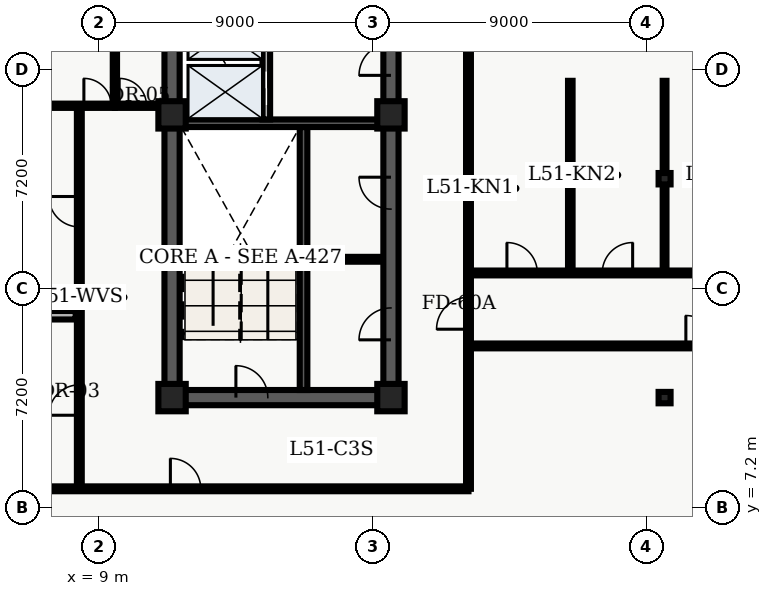
"""IFC4 building model, lengths in metres.
Left out: names, types, materials, properties, quantities, classifications, styles, units other than length and angle.
Written with IfcOpenShell. Run it as: python <this file> out.ifc"""

import sys

from ifc_helpers import new_model, entity, si_unit, converted_unit, direction, frame, origin_with_axes, origin_2d_with_axis, place, context, subcontext, project, spatial, polyline, rectangle, i_section, outline, extrude, element, fill, save


model = new_model("IFC4")
c1 = context("Model", 3, precision=1e-05, world=origin_with_axes(), true_north=direction((0.0, 1.0)))
c2 = subcontext(c1, "Body", "Model", "MODEL_VIEW")
j1 = project(units=[si_unit("LENGTHUNIT", "METRE"), converted_unit("PLANEANGLEUNIT", "DEGREE", entity("IfcPlaneAngleMeasure", 0.017), si_unit("PLANEANGLEUNIT", "RADIAN"), dimensions=[0, 0, 0, 0, 0, 0, 0])], contexts=[c1])
p1 = place(None, origin_with_axes())
s1 = spatial("IfcSite", under=j1, at=p1, CompositionType="ELEMENT")
p2 = place(p1, origin_with_axes())
s2 = spatial("IfcBuilding", under=s1, at=p2, CompositionType="ELEMENT")
p3 = place(p2, frame((0.0, 0.0, 208.2), z_axis=(0.0, 0.0, 1.0), x_axis=(1.0, 0.0, 0.0)))
s3 = spatial("IfcBuildingStorey", under=s2, at=p3, CompositionType="ELEMENT", Elevation=208.2)
p4 = place(p3, frame((11.4, 10.8, 0.0), z_axis=(0.0, 0.0, 1.0), x_axis=(0.0, 1.0, 0.0)))
e1 = element("IfcWall", 1, at=p4, inside=s3, PredefinedType="SHEAR", context=c2, shape_type="SweptSolid", body=[
    extrude(outline(polyline([(0.0, -0.25), (27.0, -0.25), (27.0, 0.25), (0.0, 0.25), (0.0, -0.25)])), origin_with_axes(), (0.0, 0.0, 1.0), 3.66),
])
p5 = place(p3, frame((11.4, 10.8, 0.0), z_axis=(0.0, 0.0, 1.0), x_axis=(1.0, 0.0, 0.0)))
e2 = element("IfcWall", 2, at=p5, inside=s3, PredefinedType="SHEAR", context=c2, shape_type="SweptSolid", body=[
    extrude(outline(polyline([(0.0, -0.25), (7.2, -0.25), (7.2, 0.25), (0.0, 0.25), (0.0, -0.25)])), origin_with_axes(), (0.0, 0.0, 1.0), 3.66),
])
p6 = place(p5, frame((2.625, 0.0, 0.0), z_axis=(0.0, 0.0, 1.0), x_axis=(1.0, 0.0, 0.0)))
e3 = element("IfcOpeningElement", 3, at=p6, cuts=e2, PredefinedType="OPENING", context=c2, shape_type="SweptSolid", body=[
    extrude(rectangle(XDim=1.05, YDim=0.52, at=origin_2d_with_axis()), origin_with_axes(), (0.0, 0.0, 1.0), 2.15),
])
p7 = place(p3, frame((18.6, 10.8, 0.0), z_axis=(0.0, 0.0, 1.0), x_axis=(0.0, 1.0, 0.0)))
e4 = element("IfcWall", 4, at=p7, inside=s3, PredefinedType="SHEAR", context=c2, shape_type="SweptSolid", body=[
    extrude(outline(polyline([(0.0, -0.25), (13.5, -0.25), (13.5, 0.25), (0.0, 0.25), (0.0, -0.25)])), origin_with_axes(), (0.0, 0.0, 1.0), 3.66),
])
p8 = place(p7, frame((11.125, 0.0, 0.0), z_axis=(0.0, 0.0, 1.0), x_axis=(1.0, 0.0, 0.0)))
e5 = element("IfcOpeningElement", 5, at=p8, cuts=e4, PredefinedType="OPENING", context=c2, shape_type="SweptSolid", body=[
    extrude(rectangle(XDim=1.05, YDim=0.52, at=origin_2d_with_axis()), origin_with_axes(), (0.0, 0.0, 1.0), 2.15),
])
p9 = place(p7, frame((2.425, 0.0, 0.0), z_axis=(0.0, 0.0, 1.0), x_axis=(1.0, 0.0, 0.0)))
e6 = element("IfcOpeningElement", 6, at=p9, cuts=e4, PredefinedType="OPENING", context=c2, shape_type="SweptSolid", body=[
    extrude(rectangle(XDim=1.05, YDim=0.52, at=origin_2d_with_axis()), origin_with_axes(), (0.0, 0.0, 1.0), 2.15),
])
p10 = place(p7, frame((6.725, 0.0, 0.0), z_axis=(0.0, 0.0, 1.0), x_axis=(1.0, 0.0, 0.0)))
e7 = element("IfcOpeningElement", 7, at=p10, cuts=e4, PredefinedType="OPENING", context=c2, shape_type="SweptSolid", body=[
    extrude(rectangle(XDim=1.05, YDim=0.52, at=origin_2d_with_axis()), origin_with_axes(), (0.0, 0.0, 1.0), 2.15),
])
p11 = place(p3, frame((15.725, 11.05, 0.0), z_axis=(0.0, 0.0, 1.0), x_axis=(0.0, 1.0, 0.0)))
e8 = element("IfcWall", 8, at=p11, inside=s3, PredefinedType="SHEAR", context=c2, shape_type="SweptSolid", body=[
    extrude(outline(polyline([(0.0, -0.125), (8.65, -0.125), (8.65, 0.125), (0.0, 0.125), (0.0, -0.125)])), origin_with_axes(), (0.0, 0.0, 1.0), 3.66),
])
p12 = place(p3, frame((11.65, 19.825, 0.0), z_axis=(0.0, 0.0, 1.0), x_axis=(1.0, 0.0, 0.0)))
e9 = element("IfcWall", 9, at=p12, inside=s3, PredefinedType="SHEAR", context=c2, shape_type="SweptSolid", body=[
    extrude(outline(polyline([(0.0, -0.125), (6.7, -0.125), (6.7, 0.125), (0.0, 0.125), (0.0, -0.125)])), origin_with_axes(), (0.0, 0.0, 1.0), 3.66),
])
p13 = place(p3, frame((14.5, 19.95, 0.0), z_axis=(0.0, 0.0, 1.0), x_axis=(0.0, 1.0, 0.0)))
e10 = element("IfcWall", 10, at=p13, inside=s3, PredefinedType="SOLIDWALL", context=c2, shape_type="SweptSolid", body=[
    extrude(outline(polyline([(0.0, -0.125), (6.25, -0.125), (6.25, 0.125), (0.0, 0.125), (0.0, -0.125)])), origin_with_axes(), (0.0, 0.0, 1.0), 2.7),
])
p14 = place(p13, frame((1.025, 0.0, 0.0), z_axis=(0.0, 0.0, 1.0), x_axis=(1.0, 0.0, 0.0)))
e11 = element("IfcOpeningElement", 11, at=p14, cuts=e10, PredefinedType="OPENING", context=c2, shape_type="SweptSolid", body=[
    extrude(rectangle(XDim=1.1, YDim=0.27, at=origin_2d_with_axis()), origin_with_axes(), (0.0, 0.0, 1.0), 2.15),
])
p15 = place(p13, frame((2.975, 0.0, 0.0), z_axis=(0.0, 0.0, 1.0), x_axis=(1.0, 0.0, 0.0)))
e12 = element("IfcOpeningElement", 12, at=p15, cuts=e10, PredefinedType="OPENING", context=c2, shape_type="SweptSolid", body=[
    extrude(rectangle(XDim=1.1, YDim=0.27, at=origin_2d_with_axis()), origin_with_axes(), (0.0, 0.0, 1.0), 2.15),
])
p16 = place(p13, frame((5.425, 0.0, 0.0), z_axis=(0.0, 0.0, 1.0), x_axis=(1.0, 0.0, 0.0)))
e13 = element("IfcOpeningElement", 13, at=p16, cuts=e10, PredefinedType="OPENING", context=c2, shape_type="SweptSolid", body=[
    extrude(rectangle(XDim=1.2, YDim=0.27, at=origin_2d_with_axis()), origin_with_axes(), (0.0, 0.0, 1.0), 2.15),
])
for number, where, z_axis, x_axis in (
    (14, (11.4, 10.8, 0.0), (0.0, 0.0, 1.0), (1.0, 0.0, 0.0)),
    (15, (11.4, 20.1, 0.0), (0.0, 0.0, 1.0), (1.0, 0.0, 0.0)),
    (16, (18.6, 10.8, 0.0), (0.0, 0.0, 1.0), (1.0, 0.0, 0.0)),
    (17, (18.6, 20.1, 0.0), (0.0, 0.0, 1.0), (1.0, 0.0, 0.0)),
):
    element("IfcColumn", number, at=place(p3, frame(where, z_axis=z_axis, x_axis=x_axis)), inside=s3, PredefinedType="COLUMN", context=c2, shape_type="SweptSolid", body=[
        extrude(rectangle(XDim=0.9, YDim=0.9, at=origin_2d_with_axis()), origin_with_axes(), (0.0, 0.0, 1.0), 3.9),
    ])
for number, where, z_axis, x_axis in (
    (18, (27.6, 10.8, 0.0), (0.0, 0.0, 1.0), (1.0, 0.0, 0.0)),
    (19, (27.6, 18.0, 0.0), (0.0, 0.0, 1.0), (1.0, 0.0, 0.0)),
):
    element("IfcColumn", number, at=place(p3, frame(where, z_axis=z_axis, x_axis=x_axis)), inside=s3, PredefinedType="COLUMN", context=c2, shape_type="SweptSolid", body=[
        extrude(i_section(OverallWidth=0.394, OverallDepth=0.375, WebThickness=0.017, FlangeThickness=0.028, FilletRadius=0.02, at=origin_2d_with_axis()), origin_with_axes(), (0.0, 0.0, 1.0), 3.9),
    ])
p17 = place(p3, frame((15.84, 15.35, 0.0), z_axis=(0.0, 0.0, 1.0), x_axis=(1.0, 0.0, 0.0)))
e20 = element("IfcWall", 20, at=p17, inside=s3, PredefinedType="PARTITIONING", context=c2, shape_type="SweptSolid", body=[
    extrude(outline(polyline([(0.0, -0.08), (2.46, -0.08), (2.46, 0.08), (0.0, 0.08), (0.0, -0.08)])), origin_with_axes(), (0.0, 0.0, 1.0), 2.7),
])
p18 = place(p3, frame((9.52, 20.4, 0.0), z_axis=(0.0, 0.0, 1.0), x_axis=(0.0, 1.0, 0.0)))
e21 = element("IfcWall", 21, at=p18, inside=s3, PredefinedType="PARTITIONING", context=c2, shape_type="SweptSolid", body=[
    extrude(outline(polyline([(0.0, -0.07), (4.0, -0.07), (4.0, 0.07), (0.0, 0.07), (0.0, -0.07)])), origin_with_axes(), (0.0, 0.0, 1.0), 2.7),
])
p19 = place(p3, frame((9.52, 20.4, 0.0), z_axis=(0.0, 0.0, 1.0), x_axis=(1.0, 0.0, 0.0)))
e22 = element("IfcWall", 22, at=p19, inside=s3, PredefinedType="PARTITIONING", context=c2, shape_type="SweptSolid", body=[
    extrude(outline(polyline([(0.0, -0.07), (1.58, -0.07), (1.58, 0.07), (0.0, 0.07), (0.0, -0.07)])), origin_with_axes(), (0.0, 0.0, 1.0), 2.7),
])
p20 = place(p19, frame((0.59, 0.0, 0.0), z_axis=(0.0, 0.0, 1.0), x_axis=(1.0, 0.0, 0.0)))
e23 = element("IfcOpeningElement", 23, at=p20, cuts=e22, PredefinedType="OPENING", context=c2, shape_type="SweptSolid", body=[
    extrude(rectangle(XDim=0.9, YDim=0.16, at=origin_2d_with_axis()), origin_with_axes(), (0.0, 0.0, 1.0), 2.15),
])
p21 = place(p3, frame((2.6, 7.8, 0.0), z_axis=(0.0, 0.0, 1.0), x_axis=(1.0, 0.0, 0.0)))
e24 = element("IfcWall", 24, at=p21, inside=s3, PredefinedType="PARTITIONING", context=c2, shape_type="SweptSolid", body=[
    extrude(outline(polyline([(0.0, -0.08), (18.55, -0.08), (18.55, 0.08), (0.0, 0.08), (0.0, -0.08)])), origin_with_axes(), (0.0, 0.0, 1.0), 2.7),
])
p22 = place(p21, frame((9.245, 0.0, 0.0), z_axis=(0.0, 0.0, 1.0), x_axis=(1.0, 0.0, 0.0)))
e25 = element("IfcOpeningElement", 25, at=p22, cuts=e24, PredefinedType="OPENING", context=c2, shape_type="SweptSolid", body=[
    extrude(rectangle(XDim=1.0, YDim=0.18, at=origin_2d_with_axis()), origin_with_axes(), (0.0, 0.0, 1.0), 2.15),
])
p23 = place(p3, frame((21.15, 7.8, 0.0), z_axis=(0.0, 0.0, 1.0), x_axis=(0.0, 1.0, 0.0)))
e26 = element("IfcWall", 26, at=p23, inside=s3, PredefinedType="PARTITIONING", context=c2, shape_type="SweptSolid", body=[
    extrude(outline(polyline([(0.0, -0.08), (32.7, -0.08), (32.7, 0.08), (0.0, 0.08), (0.0, -0.08)])), origin_with_axes(), (0.0, 0.0, 1.0), 2.7),
])
p24 = place(p23, frame((15.566, 0.0, 0.0), z_axis=(0.0, 0.0, 1.0), x_axis=(1.0, 0.0, 0.0)))
e27 = element("IfcOpeningElement", 27, at=p24, cuts=e26, PredefinedType="OPENING", context=c2, shape_type="SweptSolid", body=[
    extrude(rectangle(XDim=1.0, YDim=0.18, at=origin_2d_with_axis()), origin_with_axes(), (0.0, 0.0, 1.0), 2.15),
])
p25 = place(p23, frame((19.003, 0.0, 0.0), z_axis=(0.0, 0.0, 1.0), x_axis=(1.0, 0.0, 0.0)))
e28 = element("IfcOpeningElement", 28, at=p25, cuts=e26, PredefinedType="OPENING", context=c2, shape_type="SweptSolid", body=[
    extrude(rectangle(XDim=1.0, YDim=0.18, at=origin_2d_with_axis()), origin_with_axes(), (0.0, 0.0, 1.0), 2.15),
])
p26 = place(p23, frame((22.854, 0.0, 0.0), z_axis=(0.0, 0.0, 1.0), x_axis=(1.0, 0.0, 0.0)))
e29 = element("IfcOpeningElement", 29, at=p26, cuts=e26, PredefinedType="OPENING", context=c2, shape_type="SweptSolid", body=[
    extrude(rectangle(XDim=1.0, YDim=0.18, at=origin_2d_with_axis()), origin_with_axes(), (0.0, 0.0, 1.0), 2.15),
])
p27 = place(p23, frame((27.208, 0.0, 0.0), z_axis=(0.0, 0.0, 1.0), x_axis=(1.0, 0.0, 0.0)))
e30 = element("IfcOpeningElement", 30, at=p27, cuts=e26, PredefinedType="OPENING", context=c2, shape_type="SweptSolid", body=[
    extrude(rectangle(XDim=1.0, YDim=0.18, at=origin_2d_with_axis()), origin_with_axes(), (0.0, 0.0, 1.0), 2.15),
])
p28 = place(p23, frame((31.041, 0.0, 0.0), z_axis=(0.0, 0.0, 1.0), x_axis=(1.0, 0.0, 0.0)))
e31 = element("IfcOpeningElement", 31, at=p28, cuts=e26, PredefinedType="OPENING", context=c2, shape_type="SweptSolid", body=[
    extrude(rectangle(XDim=1.0, YDim=0.18, at=origin_2d_with_axis()), origin_with_axes(), (0.0, 0.0, 1.0), 2.15),
])
p29 = place(p23, frame((5.775, 0.0, 0.0), z_axis=(0.0, 0.0, 1.0), x_axis=(1.0, 0.0, 0.0)))
e32 = element("IfcOpeningElement", 32, at=p29, cuts=e26, PredefinedType="OPENING", context=c2, shape_type="SweptSolid", body=[
    extrude(rectangle(XDim=1.05, YDim=0.18, at=origin_2d_with_axis()), origin_with_axes(), (0.0, 0.0, 1.0), 2.15),
])
p30 = place(p3, frame((8.35, 7.8, 0.0), z_axis=(0.0, 0.0, 1.0), x_axis=(0.0, 1.0, 0.0)))
e33 = element("IfcWall", 33, at=p30, inside=s3, PredefinedType="PARTITIONING", context=c2, shape_type="SweptSolid", body=[
    extrude(outline(polyline([(0.0, -0.08), (12.6, -0.08), (12.6, 0.08), (0.0, 0.08), (0.0, -0.08)])), origin_with_axes(), (0.0, 0.0, 1.0), 2.7),
])
p31 = place(p30, frame((2.92, 0.0, 0.0), z_axis=(0.0, 0.0, 1.0), x_axis=(1.0, 0.0, 0.0)))
e34 = element("IfcOpeningElement", 34, at=p31, cuts=e33, PredefinedType="OPENING", context=c2, shape_type="SweptSolid", body=[
    extrude(rectangle(XDim=1.0, YDim=0.18, at=origin_2d_with_axis()), origin_with_axes(), (0.0, 0.0, 1.0), 2.15),
])
p32 = place(p30, frame((9.115, 0.0, 0.0), z_axis=(0.0, 0.0, 1.0), x_axis=(1.0, 0.0, 0.0)))
e35 = element("IfcOpeningElement", 35, at=p32, cuts=e33, PredefinedType="OPENING", context=c2, shape_type="SweptSolid", body=[
    extrude(rectangle(XDim=1.0, YDim=0.18, at=origin_2d_with_axis()), origin_with_axes(), (0.0, 0.0, 1.0), 2.15),
])
p33 = place(p3, frame((0.335, 20.4, 0.0), z_axis=(0.0, 0.0, 1.0), x_axis=(1.0, 0.0, 0.0)))
e36 = element("IfcWall", 36, at=p33, inside=s3, PredefinedType="PARTITIONING", context=c2, shape_type="SweptSolid", body=[
    extrude(outline(polyline([(0.0, -0.07), (9.185, -0.07), (9.185, 0.07), (0.0, 0.07), (0.0, -0.07)])), origin_with_axes(), (0.0, 0.0, 1.0), 2.7),
])
p34 = place(p33, frame((8.615, 0.0, 0.0), z_axis=(0.0, 0.0, 1.0), x_axis=(1.0, 0.0, 0.0)))
e37 = element("IfcOpeningElement", 37, at=p34, cuts=e36, PredefinedType="OPENING", context=c2, shape_type="SweptSolid", body=[
    extrude(rectangle(XDim=0.9, YDim=0.16, at=origin_2d_with_axis()), origin_with_axes(), (0.0, 0.0, 1.0), 2.15),
])
p35 = place(p3, frame((0.335, 13.51, 0.0), z_axis=(0.0, 0.0, 1.0), x_axis=(1.0, 0.0, 0.0)))
e38 = element("IfcWall", 38, at=p35, inside=s3, PredefinedType="PARTITIONING", context=c2, shape_type="SweptSolid", body=[
    extrude(outline(polyline([(0.0, -0.14), (7.895, -0.14), (7.895, 0.14), (0.0, 0.14), (0.0, -0.14)])), origin_with_axes(), (0.0, 0.0, 1.0), 2.7),
])
p36 = place(p3, frame((21.15, 12.5, 0.0), z_axis=(0.0, 0.0, 1.0), x_axis=(1.0, 0.0, 0.0)))
e39 = element("IfcWall", 39, at=p36, inside=s3, PredefinedType="PARTITIONING", context=c2, shape_type="SweptSolid", body=[
    extrude(outline(polyline([(0.0, -0.08), (15.2, -0.08), (15.2, 0.08), (0.0, 0.08), (0.0, -0.08)])), origin_with_axes(), (0.0, 0.0, 1.0), 2.7),
])
p37 = place(p36, frame((7.65, 0.0, 0.0), z_axis=(0.0, 0.0, 1.0), x_axis=(1.0, 0.0, 0.0)))
e40 = element("IfcOpeningElement", 40, at=p37, cuts=e39, PredefinedType="OPENING", context=c2, shape_type="SweptSolid", body=[
    extrude(rectangle(XDim=1.0, YDim=0.18, at=origin_2d_with_axis()), origin_with_axes(), (0.0, 0.0, 1.0), 2.15),
])
p38 = place(p3, frame((21.15, 14.9, 0.0), z_axis=(0.0, 0.0, 1.0), x_axis=(1.0, 0.0, 0.0)))
e41 = element("IfcWall", 41, at=p38, inside=s3, PredefinedType="PARTITIONING", context=c2, shape_type="SweptSolid", body=[
    extrude(outline(polyline([(0.0, -0.08), (15.2, -0.08), (15.2, 0.08), (0.0, 0.08), (0.0, -0.08)])), origin_with_axes(), (0.0, 0.0, 1.0), 2.7),
])
p39 = place(p38, frame((1.764, 0.0, 0.0), z_axis=(0.0, 0.0, 1.0), x_axis=(1.0, 0.0, 0.0)))
e42 = element("IfcOpeningElement", 42, at=p39, cuts=e41, PredefinedType="OPENING", context=c2, shape_type="SweptSolid", body=[
    extrude(rectangle(XDim=1.0, YDim=0.18, at=origin_2d_with_axis()), origin_with_axes(), (0.0, 0.0, 1.0), 2.15),
])
p40 = place(p38, frame((4.899, 0.0, 0.0), z_axis=(0.0, 0.0, 1.0), x_axis=(1.0, 0.0, 0.0)))
e43 = element("IfcOpeningElement", 43, at=p40, cuts=e41, PredefinedType="OPENING", context=c2, shape_type="SweptSolid", body=[
    extrude(rectangle(XDim=1.0, YDim=0.18, at=origin_2d_with_axis()), origin_with_axes(), (0.0, 0.0, 1.0), 2.15),
])
p41 = place(p38, frame((8.576, 0.0, 0.0), z_axis=(0.0, 0.0, 1.0), x_axis=(1.0, 0.0, 0.0)))
e44 = element("IfcOpeningElement", 44, at=p41, cuts=e41, PredefinedType="OPENING", context=c2, shape_type="SweptSolid", body=[
    extrude(rectangle(XDim=1.0, YDim=0.18, at=origin_2d_with_axis()), origin_with_axes(), (0.0, 0.0, 1.0), 2.15),
])
p42 = place(p38, frame((12.911, 0.0, 0.0), z_axis=(0.0, 0.0, 1.0), x_axis=(1.0, 0.0, 0.0)))
e45 = element("IfcOpeningElement", 45, at=p42, cuts=e41, PredefinedType="OPENING", context=c2, shape_type="SweptSolid", body=[
    extrude(rectangle(XDim=1.0, YDim=0.18, at=origin_2d_with_axis()), origin_with_axes(), (0.0, 0.0, 1.0), 2.15),
])
p43 = place(p3, frame((24.499, 15.02, 0.0), z_axis=(0.0, 0.0, 1.0), x_axis=(0.0, 1.0, 0.0)))
e46 = element("IfcWall", 46, at=p43, inside=s3, PredefinedType="PARTITIONING", context=c2, shape_type="SweptSolid", body=[
    extrude(outline(polyline([(0.0, -0.075), (6.2, -0.075), (6.2, 0.075), (0.0, 0.075), (0.0, -0.075)])), origin_with_axes(), (0.0, 0.0, 1.0), 2.7),
])
p44 = place(p3, frame((27.6, 15.02, 0.0), z_axis=(0.0, 0.0, 1.0), x_axis=(0.0, 1.0, 0.0)))
e47 = element("IfcWall", 47, at=p44, inside=s3, PredefinedType="PARTITIONING", context=c2, shape_type="SweptSolid", body=[
    extrude(outline(polyline([(0.0, -0.062), (6.2, -0.062), (6.2, 0.062), (0.0, 0.062), (0.0, -0.062)])), origin_with_axes(), (0.0, 0.0, 1.0), 2.7),
])
p45 = place(p13, frame((1.025, 0.0, 0.0), z_axis=(0.0, 0.0, 1.0), x_axis=(1.0, 0.0, 0.0)))
e48 = element("IfcDoor", 48, at=p45, inside=s3, OperationType="SLIDING_TO_LEFT", PredefinedType="DOOR", context=c2, shape_type="SweptSolid", body=[
    extrude(rectangle(XDim=1.1, YDim=0.09, at=origin_2d_with_axis()), origin_with_axes(), (0.0, 0.0, 1.0), 2.15),
])
fill(e11, e48)
p46 = place(p5, frame((2.625, 0.0, 0.0), z_axis=(0.0, 0.0, 1.0), x_axis=(1.0, 0.0, 0.0)))
e49 = element("IfcDoor", 49, at=p46, inside=s3, OperationType="SINGLE_SWING_LEFT", PredefinedType="DOOR", context=c2, shape_type="SweptSolid", body=[
    extrude(rectangle(XDim=1.05, YDim=0.09, at=origin_2d_with_axis()), origin_with_axes(), (0.0, 0.0, 1.0), 2.15),
])
fill(e3, e49)
p47 = place(p7, frame((11.125, 0.0, 0.0), z_axis=(0.0, 0.0, 1.0), x_axis=(1.0, 0.0, 0.0)))
e50 = element("IfcDoor", 50, at=p47, inside=s3, OperationType="SINGLE_SWING_LEFT", PredefinedType="DOOR", context=c2, shape_type="SweptSolid", body=[
    extrude(rectangle(XDim=1.05, YDim=0.09, at=origin_2d_with_axis()), origin_with_axes(), (0.0, 0.0, 1.0), 2.15),
])
fill(e5, e50)
p48 = place(p7, frame((2.425, 0.0, 0.0), z_axis=(0.0, 0.0, 1.0), x_axis=(1.0, 0.0, 0.0)))
e51 = element("IfcDoor", 51, at=p48, inside=s3, OperationType="SINGLE_SWING_LEFT", PredefinedType="DOOR", context=c2, shape_type="SweptSolid", body=[
    extrude(rectangle(XDim=1.05, YDim=0.09, at=origin_2d_with_axis()), origin_with_axes(), (0.0, 0.0, 1.0), 2.15),
])
fill(e6, e51)
p49 = place(p7, frame((6.725, 0.0, 0.0), z_axis=(0.0, 0.0, 1.0), x_axis=(1.0, 0.0, 0.0)))
e52 = element("IfcDoor", 52, at=p49, inside=s3, OperationType="SINGLE_SWING_RIGHT", PredefinedType="DOOR", context=c2, shape_type="SweptSolid", body=[
    extrude(rectangle(XDim=1.05, YDim=0.09, at=origin_2d_with_axis()), origin_with_axes(), (0.0, 0.0, 1.0), 2.15),
])
fill(e7, e52)
p50 = place(p19, frame((0.59, 0.0, 0.0), z_axis=(0.0, 0.0, 1.0), x_axis=(1.0, 0.0, 0.0)))
e53 = element("IfcDoor", 53, at=p50, inside=s3, OperationType="SINGLE_SWING_LEFT", PredefinedType="DOOR", context=c2, shape_type="SweptSolid", body=[
    extrude(rectangle(XDim=0.9, YDim=0.084, at=origin_2d_with_axis()), origin_with_axes(), (0.0, 0.0, 1.0), 2.15),
])
fill(e23, e53)
p51 = place(p33, frame((8.615, 0.0, 0.0), z_axis=(0.0, 0.0, 1.0), x_axis=(1.0, 0.0, 0.0)))
e54 = element("IfcDoor", 54, at=p51, inside=s3, OperationType="SINGLE_SWING_LEFT", PredefinedType="DOOR", context=c2, shape_type="SweptSolid", body=[
    extrude(rectangle(XDim=0.9, YDim=0.084, at=origin_2d_with_axis()), origin_with_axes(), (0.0, 0.0, 1.0), 2.15),
])
fill(e37, e54)
p52 = place(p30, frame((2.92, 0.0, 0.0), z_axis=(0.0, 0.0, 1.0), x_axis=(1.0, 0.0, 0.0)))
e55 = element("IfcDoor", 55, at=p52, inside=s3, OperationType="SINGLE_SWING_LEFT", PredefinedType="DOOR", context=c2, shape_type="SweptSolid", body=[
    extrude(rectangle(XDim=1.0, YDim=0.09, at=origin_2d_with_axis()), origin_with_axes(), (0.0, 0.0, 1.0), 2.15),
])
fill(e34, e55)
p53 = place(p30, frame((9.115, 0.0, 0.0), z_axis=(0.0, 0.0, 1.0), x_axis=(1.0, 0.0, 0.0)))
e56 = element("IfcDoor", 56, at=p53, inside=s3, OperationType="SINGLE_SWING_RIGHT", PredefinedType="DOOR", context=c2, shape_type="SweptSolid", body=[
    extrude(rectangle(XDim=1.0, YDim=0.09, at=origin_2d_with_axis()), origin_with_axes(), (0.0, 0.0, 1.0), 2.15),
])
fill(e35, e56)
p54 = place(p21, frame((9.245, 0.0, 0.0), z_axis=(0.0, 0.0, 1.0), x_axis=(1.0, 0.0, 0.0)))
e57 = element("IfcDoor", 57, at=p54, inside=s3, OperationType="SINGLE_SWING_LEFT", PredefinedType="DOOR", context=c2, shape_type="SweptSolid", body=[
    extrude(rectangle(XDim=1.0, YDim=0.09, at=origin_2d_with_axis()), origin_with_axes(), (0.0, 0.0, 1.0), 2.15),
])
fill(e25, e57)
p55 = place(p23, frame((5.775, 0.0, 0.0), z_axis=(0.0, 0.0, 1.0), x_axis=(1.0, 0.0, 0.0)))
e58 = element("IfcDoor", 58, at=p55, inside=s3, OperationType="SINGLE_SWING_LEFT", PredefinedType="DOOR", context=c2, shape_type="SweptSolid", body=[
    extrude(rectangle(XDim=1.05, YDim=0.09, at=origin_2d_with_axis()), origin_with_axes(), (0.0, 0.0, 1.0), 2.15),
])
fill(e32, e58)
p56 = place(p36, frame((7.65, 0.0, 0.0), z_axis=(0.0, 0.0, 1.0), x_axis=(1.0, 0.0, 0.0)))
e59 = element("IfcDoor", 59, at=p56, inside=s3, OperationType="SINGLE_SWING_LEFT", PredefinedType="DOOR", context=c2, shape_type="SweptSolid", body=[
    extrude(rectangle(XDim=1.0, YDim=0.09, at=origin_2d_with_axis()), origin_with_axes(), (0.0, 0.0, 1.0), 2.15),
])
fill(e40, e59)
p57 = place(p38, frame((1.764, 0.0, 0.0), z_axis=(0.0, 0.0, 1.0), x_axis=(1.0, 0.0, 0.0)))
e60 = element("IfcDoor", 60, at=p57, inside=s3, OperationType="SINGLE_SWING_LEFT", PredefinedType="DOOR", context=c2, shape_type="SweptSolid", body=[
    extrude(rectangle(XDim=1.0, YDim=0.09, at=origin_2d_with_axis()), origin_with_axes(), (0.0, 0.0, 1.0), 2.15),
])
fill(e42, e60)
p58 = place(p38, frame((4.899, 0.0, 0.0), z_axis=(0.0, 0.0, 1.0), x_axis=(1.0, 0.0, 0.0)))
e61 = element("IfcDoor", 61, at=p58, inside=s3, OperationType="SINGLE_SWING_RIGHT", PredefinedType="DOOR", context=c2, shape_type="SweptSolid", body=[
    extrude(rectangle(XDim=1.0, YDim=0.09, at=origin_2d_with_axis()), origin_with_axes(), (0.0, 0.0, 1.0), 2.15),
])
fill(e43, e61)
save(model, sys.argv[1])
